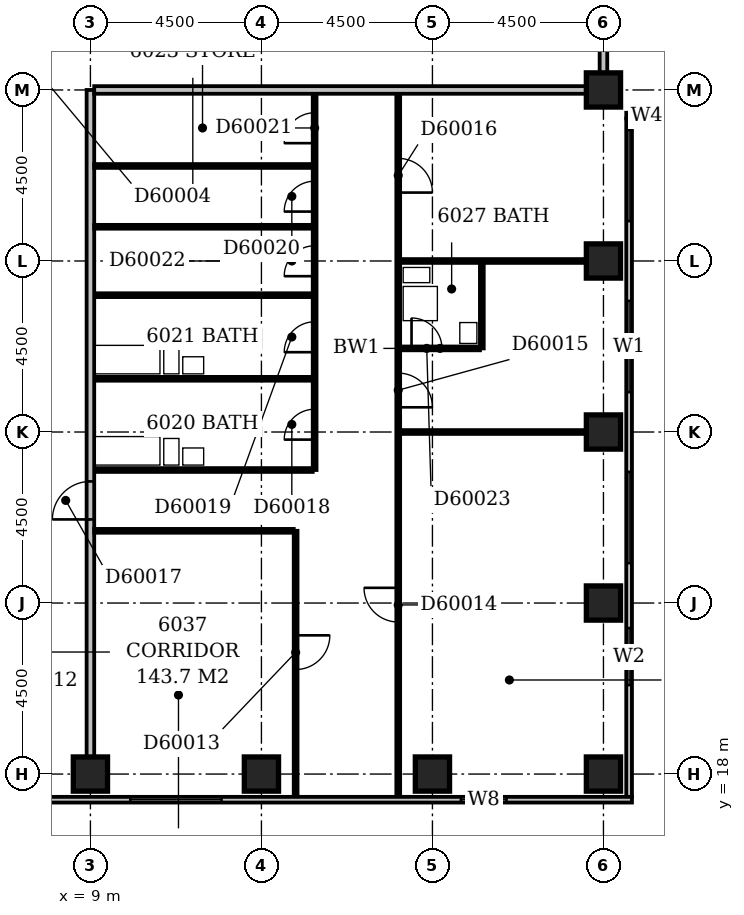
"""IFC4 building model, lengths in metres.
Left out: names, types, materials, properties, quantities, classifications, styles, units other than length and angle.
Written with IfcOpenShell. Run it as: python <this file> out.ifc"""

import sys

from ifc_helpers import new_model, si_unit, direction, frame, frame_2d, origin, origin_2d, place, context, subcontext, project, spatial, rectangle, extrude, element, fill, save


model = new_model("IFC4")
c1 = context("Model", 3, precision=1e-05, world=origin(), true_north=direction((0.0, 1.0)))
c2 = subcontext(c1, "Body", "Model", "MODEL_VIEW")
j1 = project(units=[si_unit("LENGTHUNIT", "METRE"), si_unit("PLANEANGLEUNIT", "RADIAN")], contexts=[c1])
p1 = place(None, origin())
s1 = spatial("IfcSite", under=j1, at=p1, CompositionType="ELEMENT")
p2 = place(p1, origin())
s2 = spatial("IfcBuilding", under=s1, at=p2, CompositionType="ELEMENT")
p3 = place(p2, frame((0.0, 0.0, 233.0)))
s3 = spatial("IfcBuildingStorey", under=s2, at=p3, CompositionType="ELEMENT", Elevation=233.0)
for number, where, z_axis, x_axis in (
    (1, (9.0, 18.0, -0.35), (0.0, 0.0, 1.0), (1.0, 0.0, 0.0)),
    (2, (13.5, 18.0, -0.35), (0.0, 0.0, 1.0), (1.0, 0.0, 0.0)),
    (3, (18.0, 18.0, -0.35), (0.0, 0.0, 1.0), (1.0, 0.0, 0.0)),
    (4, (22.5, 18.0, -0.35), (0.0, 0.0, 1.0), (1.0, 0.0, 0.0)),
    (5, (22.5, 22.5, -0.35), (0.0, 0.0, 1.0), (1.0, 0.0, 0.0)),
    (6, (22.5, 27.0, -0.35), (0.0, 0.0, 1.0), (1.0, 0.0, 0.0)),
    (7, (22.5, 31.5, -0.35), (0.0, 0.0, 1.0), (1.0, 0.0, 0.0)),
    (8, (22.5, 36.0, -0.35), (0.0, 0.0, 1.0), (1.0, 0.0, 0.0)),
):
    element("IfcColumn", number, at=place(p3, frame(where, z_axis=z_axis, x_axis=x_axis)), inside=s3, PredefinedType="COLUMN", context=c2, shape_type="SweptSolid", body=[
        extrude(rectangle(XDim=0.9, YDim=0.9, at=origin_2d()), origin(), (0.0, 0.0, 1.0), 3.65),
    ])
p4 = place(p3, frame((3.9, 17.325, 0.0), z_axis=(0.0, 0.0, 1.0), x_axis=(1.0, 0.0, 0.0)))
e9 = element("IfcWall", 9, at=p4, inside=s3, PredefinedType="STANDARD", context=c2, shape_type="SweptSolid", body=[
    extrude(rectangle(XDim=19.35, YDim=0.15, at=frame_2d((9.675, 0.0))), origin(), (0.0, 0.0, 1.0), 2.7),
])
p5 = place(p4, frame((6.15, 0.0, 0.6)))
e10 = element("IfcOpeningElement", 10, at=p5, cuts=e9, PredefinedType="OPENING", context=c2, shape_type="SweptSolid", body=[
    extrude(rectangle(XDim=2.4, YDim=1.8, at=frame_2d((1.2, 0.9))), frame((0.0, 0.087, 0.0), z_axis=(0.0, -1.0, 0.0), x_axis=(1.0, 0.0, 0.0)), (0.0, 0.0, 1.0), 0.174),
])
p6 = place(p4, frame((14.849, 0.0, 0.6)))
e11 = element("IfcOpeningElement", 11, at=p6, cuts=e9, PredefinedType="OPENING", context=c2, shape_type="SweptSolid", body=[
    extrude(rectangle(XDim=1.2, YDim=1.8, at=frame_2d((0.6, 0.9))), frame((0.0, 0.087, 0.0), z_axis=(0.0, -1.0, 0.0), x_axis=(1.0, 0.0, 0.0)), (0.0, 0.0, 1.0), 0.174),
])
p7 = place(p3, frame((23.175, 17.4, 0.0), z_axis=(0.0, 0.0, 1.0), x_axis=(0.0, 1.0, 0.0)))
e12 = element("IfcWall", 12, at=p7, inside=s3, PredefinedType="STANDARD", context=c2, shape_type="SweptSolid", body=[
    extrude(rectangle(XDim=17.85, YDim=0.15, at=frame_2d((8.925, 0.0))), origin(), (0.0, 0.0, 1.0), 2.7),
])
p8 = place(p7, frame((2.941, 0.0, 0.6)))
e13 = element("IfcOpeningElement", 13, at=p8, cuts=e12, PredefinedType="OPENING", context=c2, shape_type="SweptSolid", body=[
    extrude(rectangle(XDim=1.5, YDim=1.8, at=frame_2d((0.75, 0.9))), frame((0.0, 0.087, 0.0), z_axis=(0.0, -1.0, 0.0), x_axis=(1.0, 0.0, 0.0)), (0.0, 0.0, 1.0), 0.174),
])
p9 = place(p7, frame((6.15, 0.0, 0.6)))
e14 = element("IfcOpeningElement", 14, at=p9, cuts=e12, PredefinedType="OPENING", context=c2, shape_type="SweptSolid", body=[
    extrude(rectangle(XDim=2.4, YDim=1.8, at=frame_2d((1.2, 0.9))), frame((0.0, 0.087, 0.0), z_axis=(0.0, -1.0, 0.0), x_axis=(1.0, 0.0, 0.0)), (0.0, 0.0, 1.0), 0.174),
])
p10 = place(p7, frame((10.65, 0.0, 0.6)))
e15 = element("IfcOpeningElement", 15, at=p10, cuts=e12, PredefinedType="OPENING", context=c2, shape_type="SweptSolid", body=[
    extrude(rectangle(XDim=2.4, YDim=1.8, at=frame_2d((1.2, 0.9))), frame((0.0, 0.087, 0.0), z_axis=(0.0, -1.0, 0.0), x_axis=(1.0, 0.0, 0.0)), (0.0, 0.0, 1.0), 0.174),
])
p11 = place(p7, frame((15.15, 0.0, 0.6)))
e16 = element("IfcOpeningElement", 16, at=p11, cuts=e12, PredefinedType="OPENING", context=c2, shape_type="SweptSolid", body=[
    extrude(rectangle(XDim=2.4, YDim=1.8, at=frame_2d((1.2, 0.9))), frame((0.0, 0.087, 0.0), z_axis=(0.0, -1.0, 0.0), x_axis=(1.0, 0.0, 0.0)), (0.0, 0.0, 1.0), 0.174),
])
p12 = place(p3, frame((23.1, 35.325, 0.0), z_axis=(0.0, 0.0, 1.0), x_axis=(1.0, 0.0, 0.0)))
e17 = element("IfcWall", 17, at=p12, inside=s3, PredefinedType="STANDARD", context=c2, shape_type="SweptSolid", body=[
    extrude(rectangle(XDim=18.15, YDim=0.15, at=frame_2d((9.075, 0.0))), origin(), (0.0, 0.0, 1.0), 2.7),
])
p13 = place(p12, frame((0.239, 0.0, 0.6)))
e18 = element("IfcOpeningElement", 18, at=p13, cuts=e17, PredefinedType="OPENING", context=c2, shape_type="SweptSolid", body=[
    extrude(rectangle(XDim=0.6, YDim=1.8, at=frame_2d((0.3, 0.9))), frame((0.0, 0.087, 0.0), z_axis=(0.0, -1.0, 0.0), x_axis=(1.0, 0.0, 0.0)), (0.0, 0.0, 1.0), 0.174),
])
p14 = place(p12, frame((2.745, 0.0, 0.6)))
e19 = element("IfcOpeningElement", 19, at=p14, cuts=e17, PredefinedType="OPENING", context=c2, shape_type="SweptSolid", body=[
    extrude(rectangle(XDim=0.45, YDim=1.8, at=frame_2d((0.225, 0.9))), frame((0.0, 0.087, 0.0), z_axis=(0.0, -1.0, 0.0), x_axis=(1.0, 0.0, 0.0)), (0.0, 0.0, 1.0), 0.174),
])
p15 = place(p12, frame((4.95, 0.0, 0.6)))
e20 = element("IfcOpeningElement", 20, at=p15, cuts=e17, PredefinedType="OPENING", context=c2, shape_type="SweptSolid", body=[
    extrude(rectangle(XDim=2.4, YDim=1.8, at=frame_2d((1.2, 0.9))), frame((0.0, 0.087, 0.0), z_axis=(0.0, -1.0, 0.0), x_axis=(1.0, 0.0, 0.0)), (0.0, 0.0, 1.0), 0.174),
])
p16 = place(p12, frame((9.45, 0.0, 0.6)))
e21 = element("IfcOpeningElement", 21, at=p16, cuts=e17, PredefinedType="OPENING", context=c2, shape_type="SweptSolid", body=[
    extrude(rectangle(XDim=2.4, YDim=1.8, at=frame_2d((1.2, 0.9))), frame((0.0, 0.087, 0.0), z_axis=(0.0, -1.0, 0.0), x_axis=(1.0, 0.0, 0.0)), (0.0, 0.0, 1.0), 0.174),
])
p17 = place(p12, frame((13.95, 0.0, 0.6)))
e22 = element("IfcOpeningElement", 22, at=p17, cuts=e17, PredefinedType="OPENING", context=c2, shape_type="SweptSolid", body=[
    extrude(rectangle(XDim=2.4, YDim=1.8, at=frame_2d((1.2, 0.9))), frame((0.0, 0.087, 0.0), z_axis=(0.0, -1.0, 0.0), x_axis=(1.0, 0.0, 0.0)), (0.0, 0.0, 1.0), 0.174),
])
p18 = place(p3, frame((14.4, 17.4, 0.0), z_axis=(0.0, 0.0, 1.0), x_axis=(0.0, 1.0, 0.0)))
e23 = element("IfcWall", 23, at=p18, inside=s3, PredefinedType="PARTITIONING", context=c2, shape_type="SweptSolid", body=[
    extrude(rectangle(XDim=7.0, YDim=0.1, at=frame_2d((3.5, 0.0))), origin(), (0.0, 0.0, 1.0), 3.3),
])
p19 = place(p18, frame((3.35, 0.0, 0.0)))
e24 = element("IfcOpeningElement", 24, at=p19, cuts=e23, PredefinedType="OPENING", context=c2, shape_type="SweptSolid", body=[
    extrude(rectangle(XDim=0.9, YDim=2.1, at=frame_2d((0.45, 1.05))), frame((0.0, 0.062, 0.0), z_axis=(0.0, -1.0, 0.0), x_axis=(1.0, 0.0, 0.0)), (0.0, 0.0, 1.0), 0.124),
])
p20 = place(p3, frame((17.1, 17.4, 0.0), z_axis=(0.0, 0.0, 1.0), x_axis=(0.0, 1.0, 0.0)))
e25 = element("IfcWall", 25, at=p20, inside=s3, PredefinedType="PARTITIONING", context=c2, shape_type="SweptSolid", body=[
    extrude(rectangle(XDim=18.5, YDim=0.1, at=frame_2d((9.25, 0.0))), origin(), (0.0, 0.0, 1.0), 3.3),
])
p21 = place(p20, frame((4.6, 0.0, 0.0)))
e26 = element("IfcOpeningElement", 26, at=p21, cuts=e25, PredefinedType="OPENING", context=c2, shape_type="SweptSolid", body=[
    extrude(rectangle(XDim=0.9, YDim=2.1, at=frame_2d((0.45, 1.05))), frame((0.0, 0.062, 0.0), z_axis=(0.0, -1.0, 0.0), x_axis=(1.0, 0.0, 0.0)), (0.0, 0.0, 1.0), 0.124),
])
p22 = place(p20, frame((10.25, 0.0, 0.0)))
e27 = element("IfcOpeningElement", 27, at=p22, cuts=e25, PredefinedType="OPENING", context=c2, shape_type="SweptSolid", body=[
    extrude(rectangle(XDim=0.9, YDim=2.1, at=frame_2d((0.45, 1.05))), frame((0.0, 0.062, 0.0), z_axis=(0.0, -1.0, 0.0), x_axis=(1.0, 0.0, 0.0)), (0.0, 0.0, 1.0), 0.124),
])
p23 = place(p20, frame((15.9, 0.0, 0.0)))
e28 = element("IfcOpeningElement", 28, at=p23, cuts=e25, PredefinedType="OPENING", context=c2, shape_type="SweptSolid", body=[
    extrude(rectangle(XDim=0.9, YDim=2.1, at=frame_2d((0.45, 1.05))), frame((0.0, 0.062, 0.0), z_axis=(0.0, -1.0, 0.0), x_axis=(1.0, 0.0, 0.0)), (0.0, 0.0, 1.0), 0.124),
])
p24 = place(p3, frame((9.0, 18.45, 0.0), z_axis=(0.0, 0.0, 1.0), x_axis=(0.0, 1.0, 0.0)))
e29 = element("IfcWall", 29, at=p24, inside=s3, PredefinedType="PARTITIONING", context=c2, shape_type="SweptSolid", body=[
    extrude(rectangle(XDim=17.55, YDim=0.2, at=frame_2d((8.775, 0.0))), origin(), (0.0, 0.0, 1.0), 3.3),
])
p25 = place(p24, frame((6.25, 0.0, 0.0)))
e30 = element("IfcOpeningElement", 30, at=p25, cuts=e29, PredefinedType="OPENING", context=c2, shape_type="SweptSolid", body=[
    extrude(rectangle(XDim=1.0, YDim=2.1, at=frame_2d((0.5, 1.05))), frame((0.0, 0.112, 0.0), z_axis=(0.0, -1.0, 0.0), x_axis=(1.0, 0.0, 0.0)), (0.0, 0.0, 1.0), 0.224),
])
p26 = place(p3, frame((9.1, 24.4, 0.0), z_axis=(0.0, 0.0, 1.0), x_axis=(1.0, 0.0, 0.0)))
e31 = element("IfcWall", 31, at=p26, inside=s3, PredefinedType="PARTITIONING", context=c2, shape_type="SweptSolid", body=[
    extrude(rectangle(XDim=5.25, YDim=0.1, at=frame_2d((2.625, 0.0))), origin(), (0.0, 0.0, 1.0), 3.3),
])
p27 = place(p3, frame((9.1, 26.0, 0.0), z_axis=(0.0, 0.0, 1.0), x_axis=(1.0, 0.0, 0.0)))
e32 = element("IfcWall", 32, at=p27, inside=s3, PredefinedType="PLUMBINGWALL", context=c2, shape_type="SweptSolid", body=[
    extrude(rectangle(XDim=5.75, YDim=0.1, at=frame_2d((2.875, 0.0))), origin(), (0.0, 0.0, 1.0), 3.3),
])
p28 = place(p3, frame((14.9, 26.0, 0.0), z_axis=(0.0, 0.0, 1.0), x_axis=(0.0, 1.0, 0.0)))
e33 = element("IfcWall", 33, at=p28, inside=s3, PredefinedType="PARTITIONING", context=c2, shape_type="SweptSolid", body=[
    extrude(rectangle(XDim=9.9, YDim=0.1, at=frame_2d((4.95, 0.0))), origin(), (0.0, 0.0, 1.0), 3.3),
])
p29 = place(p28, frame((0.8, 0.0, 0.0)))
e34 = element("IfcOpeningElement", 34, at=p29, cuts=e33, PredefinedType="OPENING", context=c2, shape_type="SweptSolid", body=[
    extrude(rectangle(XDim=0.8, YDim=2.1, at=frame_2d((0.4, 1.05))), frame((0.0, 0.062, 0.0), z_axis=(0.0, -1.0, 0.0), x_axis=(1.0, 0.0, 0.0)), (0.0, 0.0, 1.0), 0.124),
])
p30 = place(p28, frame((3.1, 0.0, 0.0)))
e35 = element("IfcOpeningElement", 35, at=p30, cuts=e33, PredefinedType="OPENING", context=c2, shape_type="SweptSolid", body=[
    extrude(rectangle(XDim=0.8, YDim=2.1, at=frame_2d((0.4, 1.05))), frame((0.0, 0.062, 0.0), z_axis=(0.0, -1.0, 0.0), x_axis=(1.0, 0.0, 0.0)), (0.0, 0.0, 1.0), 0.124),
])
p31 = place(p28, frame((6.8, 0.0, 0.0)))
e36 = element("IfcOpeningElement", 36, at=p31, cuts=e33, PredefinedType="OPENING", context=c2, shape_type="SweptSolid", body=[
    extrude(rectangle(XDim=0.8, YDim=2.1, at=frame_2d((0.4, 1.05))), frame((0.0, 0.062, 0.0), z_axis=(0.0, -1.0, 0.0), x_axis=(1.0, 0.0, 0.0)), (0.0, 0.0, 1.0), 0.124),
])
p32 = place(p28, frame((8.6, 0.0, 0.0)))
e37 = element("IfcOpeningElement", 37, at=p32, cuts=e33, PredefinedType="OPENING", context=c2, shape_type="SweptSolid", body=[
    extrude(rectangle(XDim=0.8, YDim=2.1, at=frame_2d((0.4, 1.05))), frame((0.0, 0.062, 0.0), z_axis=(0.0, -1.0, 0.0), x_axis=(1.0, 0.0, 0.0)), (0.0, 0.0, 1.0), 0.124),
])
p33 = place(p28, frame((5.1, 0.0, 0.0)))
e38 = element("IfcOpeningElement", 38, at=p33, cuts=e33, PredefinedType="OPENING", context=c2, shape_type="SweptSolid", body=[
    extrude(rectangle(XDim=0.8, YDim=2.1, at=frame_2d((0.4, 1.05))), frame((0.0, 0.062, 0.0), z_axis=(0.0, -1.0, 0.0), x_axis=(1.0, 0.0, 0.0)), (0.0, 0.0, 1.0), 0.124),
])
p34 = place(p3, frame((17.15, 27.0, 0.0), z_axis=(0.0, 0.0, 1.0), x_axis=(1.0, 0.0, 0.0)))
e39 = element("IfcWall", 39, at=p34, inside=s3, PredefinedType="PARTITIONING", context=c2, shape_type="SweptSolid", body=[
    extrude(rectangle(XDim=4.9, YDim=0.1, at=frame_2d((2.45, 0.0))), origin(), (0.0, 0.0, 1.0), 2.7),
])
p35 = place(p3, frame((9.1, 28.4, 0.0), z_axis=(0.0, 0.0, 1.0), x_axis=(1.0, 0.0, 0.0)))
e40 = element("IfcWall", 40, at=p35, inside=s3, PredefinedType="PLUMBINGWALL", context=c2, shape_type="SweptSolid", body=[
    extrude(rectangle(XDim=5.75, YDim=0.1, at=frame_2d((2.875, 0.0))), origin(), (0.0, 0.0, 1.0), 3.3),
])
p36 = place(p3, frame((17.15, 29.2, 0.0), z_axis=(0.0, 0.0, 1.0), x_axis=(1.0, 0.0, 0.0)))
e41 = element("IfcWall", 41, at=p36, inside=s3, PredefinedType="PLUMBINGWALL", context=c2, shape_type="SweptSolid", body=[
    extrude(rectangle(XDim=2.1, YDim=0.1, at=frame_2d((1.05, 0.0))), origin(), (0.0, 0.0, 1.0), 3.3),
])
p37 = place(p36, frame((0.3, 0.0, 0.0)))
e42 = element("IfcOpeningElement", 42, at=p37, cuts=e41, PredefinedType="OPENING", context=c2, shape_type="SweptSolid", body=[
    extrude(rectangle(XDim=0.8, YDim=2.1, at=frame_2d((0.4, 1.05))), frame((0.0, 0.062, 0.0), z_axis=(0.0, -1.0, 0.0), x_axis=(1.0, 0.0, 0.0)), (0.0, 0.0, 1.0), 0.124),
])
p38 = place(p3, frame((19.3, 29.2, 0.0), z_axis=(0.0, 0.0, 1.0), x_axis=(0.0, 1.0, 0.0)))
e43 = element("IfcWall", 43, at=p38, inside=s3, PredefinedType="PLUMBINGWALL", context=c2, shape_type="SweptSolid", body=[
    extrude(rectangle(XDim=2.25, YDim=0.1, at=frame_2d((1.125, 0.0))), origin(), (0.0, 0.0, 1.0), 3.3),
])
p39 = place(p3, frame((9.1, 30.6, 0.0), z_axis=(0.0, 0.0, 1.0), x_axis=(1.0, 0.0, 0.0)))
e44 = element("IfcWall", 44, at=p39, inside=s3, PredefinedType="PLUMBINGWALL", context=c2, shape_type="SweptSolid", body=[
    extrude(rectangle(XDim=5.75, YDim=0.1, at=frame_2d((2.875, 0.0))), origin(), (0.0, 0.0, 1.0), 3.3),
])
p40 = place(p3, frame((17.15, 31.5, 0.0), z_axis=(0.0, 0.0, 1.0), x_axis=(1.0, 0.0, 0.0)))
e45 = element("IfcWall", 45, at=p40, inside=s3, PredefinedType="PARTITIONING", context=c2, shape_type="SweptSolid", body=[
    extrude(rectangle(XDim=4.9, YDim=0.1, at=frame_2d((2.45, 0.0))), origin(), (0.0, 0.0, 1.0), 3.3),
])
for number, where, z_axis, x_axis in (
    (46, (9.1, 32.4, 0.0), (0.0, 0.0, 1.0), (1.0, 0.0, 0.0)),
    (47, (9.1, 34.0, 0.0), (0.0, 0.0, 1.0), (1.0, 0.0, 0.0)),
):
    element("IfcWall", number, at=place(p3, frame(where, z_axis=z_axis, x_axis=x_axis)), inside=s3, PredefinedType="PARTITIONING", context=c2, shape_type="SweptSolid", body=[
        extrude(rectangle(XDim=5.75, YDim=0.1, at=frame_2d((2.875, 0.0))), origin(), (0.0, 0.0, 1.0), 3.3),
    ])
p41 = place(p3, frame((9.1, 36.0, 0.0), z_axis=(0.0, 0.0, 1.0), x_axis=(1.0, 0.0, 0.0)))
e48 = element("IfcWall", 48, at=p41, inside=s3, PredefinedType="PARTITIONING", context=c2, shape_type="SweptSolid", body=[
    extrude(rectangle(XDim=12.95, YDim=0.2, at=frame_2d((6.475, 0.0))), origin(), (0.0, 0.0, 1.0), 3.3),
])
p42 = place(p3, frame((22.5, 36.45, 0.0), z_axis=(0.0, 0.0, 1.0), x_axis=(0.0, 1.0, 0.0)))
e49 = element("IfcWall", 49, at=p42, inside=s3, PredefinedType="PARTITIONING", context=c2, shape_type="SweptSolid", body=[
    extrude(rectangle(XDim=13.05, YDim=0.2, at=frame_2d((6.525, 0.0))), origin(), (0.0, 0.0, 1.0), 3.3),
])
p43 = place(p5, origin())
e50 = element("IfcWindow", 50, at=p43, inside=s3, PartitioningType="SINGLE_PANEL", PredefinedType="WINDOW", context=c2, shape_type="SweptSolid", body=[
    extrude(rectangle(XDim=2.4, YDim=1.8, at=frame_2d((1.2, 0.9))), frame((0.0, 0.03, 0.0), z_axis=(0.0, -1.0, 0.0), x_axis=(1.0, 0.0, 0.0)), (0.0, 0.0, 1.0), 0.06),
])
fill(e10, e50)
p44 = place(p6, origin())
e51 = element("IfcWindow", 51, at=p44, inside=s3, PartitioningType="SINGLE_PANEL", PredefinedType="WINDOW", context=c2, shape_type="SweptSolid", body=[
    extrude(rectangle(XDim=1.2, YDim=1.8, at=frame_2d((0.6, 0.9))), frame((0.0, 0.03, 0.0), z_axis=(0.0, -1.0, 0.0), x_axis=(1.0, 0.0, 0.0)), (0.0, 0.0, 1.0), 0.06),
])
fill(e11, e51)
p45 = place(p8, origin())
e52 = element("IfcWindow", 52, at=p45, inside=s3, PartitioningType="SINGLE_PANEL", PredefinedType="WINDOW", context=c2, shape_type="SweptSolid", body=[
    extrude(rectangle(XDim=1.5, YDim=1.8, at=frame_2d((0.75, 0.9))), frame((0.0, 0.03, 0.0), z_axis=(0.0, -1.0, 0.0), x_axis=(1.0, 0.0, 0.0)), (0.0, 0.0, 1.0), 0.06),
])
fill(e13, e52)
p46 = place(p9, origin())
e53 = element("IfcWindow", 53, at=p46, inside=s3, PartitioningType="SINGLE_PANEL", PredefinedType="WINDOW", context=c2, shape_type="SweptSolid", body=[
    extrude(rectangle(XDim=2.4, YDim=1.8, at=frame_2d((1.2, 0.9))), frame((0.0, 0.03, 0.0), z_axis=(0.0, -1.0, 0.0), x_axis=(1.0, 0.0, 0.0)), (0.0, 0.0, 1.0), 0.06),
])
fill(e14, e53)
p47 = place(p10, origin())
e54 = element("IfcWindow", 54, at=p47, inside=s3, PartitioningType="SINGLE_PANEL", PredefinedType="WINDOW", context=c2, shape_type="SweptSolid", body=[
    extrude(rectangle(XDim=2.4, YDim=1.8, at=frame_2d((1.2, 0.9))), frame((0.0, 0.03, 0.0), z_axis=(0.0, -1.0, 0.0), x_axis=(1.0, 0.0, 0.0)), (0.0, 0.0, 1.0), 0.06),
])
fill(e15, e54)
p48 = place(p11, origin())
e55 = element("IfcWindow", 55, at=p48, inside=s3, PartitioningType="SINGLE_PANEL", PredefinedType="WINDOW", context=c2, shape_type="SweptSolid", body=[
    extrude(rectangle(XDim=2.4, YDim=1.8, at=frame_2d((1.2, 0.9))), frame((0.0, 0.03, 0.0), z_axis=(0.0, -1.0, 0.0), x_axis=(1.0, 0.0, 0.0)), (0.0, 0.0, 1.0), 0.06),
])
fill(e16, e55)
p49 = place(p13, origin())
e56 = element("IfcWindow", 56, at=p49, inside=s3, PartitioningType="SINGLE_PANEL", PredefinedType="WINDOW", context=c2, shape_type="SweptSolid", body=[
    extrude(rectangle(XDim=0.6, YDim=1.8, at=frame_2d((0.3, 0.9))), frame((0.0, 0.03, 0.0), z_axis=(0.0, -1.0, 0.0), x_axis=(1.0, 0.0, 0.0)), (0.0, 0.0, 1.0), 0.06),
])
fill(e18, e56)
p50 = place(p19, origin())
e57 = element("IfcDoor", 57, at=p50, inside=s3, OperationType="SINGLE_SWING_RIGHT", PredefinedType="DOOR", context=c2, shape_type="SweptSolid", body=[
    extrude(rectangle(XDim=0.9, YDim=2.1, at=frame_2d((0.45, 1.05))), frame((0.0, 0.025, 0.0), z_axis=(0.0, -1.0, 0.0), x_axis=(1.0, 0.0, 0.0)), (0.0, 0.0, 1.0), 0.05),
])
fill(e24, e57)
p51 = place(p21, frame((0.9, 0.0, 0.0), z_axis=(0.0, 0.0, 1.0), x_axis=(-1.0, 0.0, 0.0)))
e58 = element("IfcDoor", 58, at=p51, inside=s3, OperationType="SINGLE_SWING_LEFT", PredefinedType="DOOR", context=c2, shape_type="SweptSolid", body=[
    extrude(rectangle(XDim=0.9, YDim=2.1, at=frame_2d((0.45, 1.05))), frame((0.0, 0.025, 0.0), z_axis=(0.0, -1.0, 0.0), x_axis=(1.0, 0.0, 0.0)), (0.0, 0.0, 1.0), 0.05),
])
fill(e26, e58)
p52 = place(p22, frame((0.9, 0.0, 0.0), z_axis=(0.0, 0.0, 1.0), x_axis=(-1.0, 0.0, 0.0)))
e59 = element("IfcDoor", 59, at=p52, inside=s3, OperationType="SINGLE_SWING_RIGHT", PredefinedType="DOOR", context=c2, shape_type="SweptSolid", body=[
    extrude(rectangle(XDim=0.9, YDim=2.1, at=frame_2d((0.45, 1.05))), frame((0.0, 0.025, 0.0), z_axis=(0.0, -1.0, 0.0), x_axis=(1.0, 0.0, 0.0)), (0.0, 0.0, 1.0), 0.05),
])
fill(e27, e59)
p53 = place(p23, frame((0.9, 0.0, 0.0), z_axis=(0.0, 0.0, 1.0), x_axis=(-1.0, 0.0, 0.0)))
e60 = element("IfcDoor", 60, at=p53, inside=s3, OperationType="SINGLE_SWING_RIGHT", PredefinedType="DOOR", context=c2, shape_type="SweptSolid", body=[
    extrude(rectangle(XDim=0.9, YDim=2.1, at=frame_2d((0.45, 1.05))), frame((0.0, 0.025, 0.0), z_axis=(0.0, -1.0, 0.0), x_axis=(1.0, 0.0, 0.0)), (0.0, 0.0, 1.0), 0.05),
])
fill(e28, e60)
p54 = place(p25, origin())
e61 = element("IfcDoor", 61, at=p54, inside=s3, OperationType="SINGLE_SWING_LEFT", PredefinedType="DOOR", context=c2, shape_type="SweptSolid", body=[
    extrude(rectangle(XDim=1.0, YDim=2.1, at=frame_2d((0.5, 1.05))), frame((0.0, 0.025, 0.0), z_axis=(0.0, -1.0, 0.0), x_axis=(1.0, 0.0, 0.0)), (0.0, 0.0, 1.0), 0.05),
])
fill(e30, e61)
p55 = place(p29, origin())
e62 = element("IfcDoor", 62, at=p55, inside=s3, OperationType="SINGLE_SWING_LEFT", PredefinedType="DOOR", context=c2, shape_type="SweptSolid", body=[
    extrude(rectangle(XDim=0.8, YDim=2.1, at=frame_2d((0.4, 1.05))), frame((0.0, 0.025, 0.0), z_axis=(0.0, -1.0, 0.0), x_axis=(1.0, 0.0, 0.0)), (0.0, 0.0, 1.0), 0.05),
])
fill(e34, e62)
p56 = place(p30, origin())
e63 = element("IfcDoor", 63, at=p56, inside=s3, OperationType="SINGLE_SWING_LEFT", PredefinedType="DOOR", context=c2, shape_type="SweptSolid", body=[
    extrude(rectangle(XDim=0.8, YDim=2.1, at=frame_2d((0.4, 1.05))), frame((0.0, 0.025, 0.0), z_axis=(0.0, -1.0, 0.0), x_axis=(1.0, 0.0, 0.0)), (0.0, 0.0, 1.0), 0.05),
])
fill(e35, e63)
p57 = place(p31, origin())
e64 = element("IfcDoor", 64, at=p57, inside=s3, OperationType="SINGLE_SWING_LEFT", PredefinedType="DOOR", context=c2, shape_type="SweptSolid", body=[
    extrude(rectangle(XDim=0.8, YDim=2.1, at=frame_2d((0.4, 1.05))), frame((0.0, 0.025, 0.0), z_axis=(0.0, -1.0, 0.0), x_axis=(1.0, 0.0, 0.0)), (0.0, 0.0, 1.0), 0.05),
])
fill(e36, e64)
p58 = place(p32, origin())
e65 = element("IfcDoor", 65, at=p58, inside=s3, OperationType="SINGLE_SWING_LEFT", PredefinedType="DOOR", context=c2, shape_type="SweptSolid", body=[
    extrude(rectangle(XDim=0.8, YDim=2.1, at=frame_2d((0.4, 1.05))), frame((0.0, 0.025, 0.0), z_axis=(0.0, -1.0, 0.0), x_axis=(1.0, 0.0, 0.0)), (0.0, 0.0, 1.0), 0.05),
])
fill(e37, e65)
p59 = place(p33, origin())
e66 = element("IfcDoor", 66, at=p59, inside=s3, OperationType="SINGLE_SWING_LEFT", PredefinedType="DOOR", context=c2, shape_type="SweptSolid", body=[
    extrude(rectangle(XDim=0.8, YDim=2.1, at=frame_2d((0.4, 1.05))), frame((0.0, 0.025, 0.0), z_axis=(0.0, -1.0, 0.0), x_axis=(1.0, 0.0, 0.0)), (0.0, 0.0, 1.0), 0.05),
])
fill(e38, e66)
p60 = place(p37, origin())
e67 = element("IfcDoor", 67, at=p60, inside=s3, OperationType="SINGLE_SWING_LEFT", PredefinedType="DOOR", context=c2, shape_type="SweptSolid", body=[
    extrude(rectangle(XDim=0.8, YDim=2.1, at=frame_2d((0.4, 1.05))), frame((0.0, 0.025, 0.0), z_axis=(0.0, -1.0, 0.0), x_axis=(1.0, 0.0, 0.0)), (0.0, 0.0, 1.0), 0.05),
])
fill(e42, e67)
save(model, sys.argv[1])
